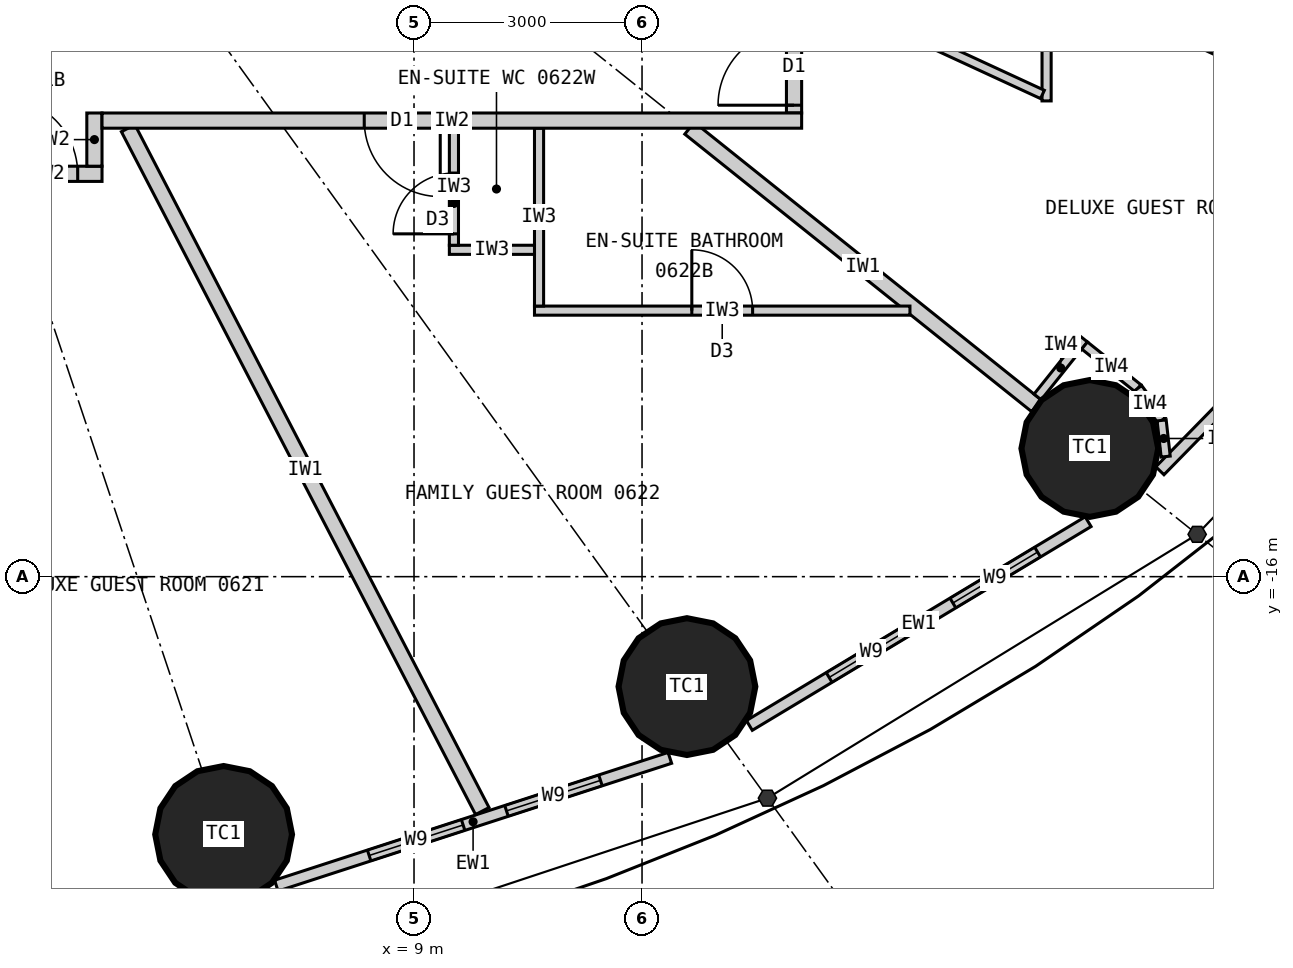
"""IFC4 building model, lengths in metres.
Left out: names, types, materials, properties, quantities, classifications, styles, units other than length and angle.
Written with IfcOpenShell. Run it as: python <this file> out.ifc"""

import sys

from ifc_helpers import new_model, si_unit, direction, frame, frame_2d, origin, origin_2d, place, context, subcontext, project, spatial, rectangle, circle, extrude, element, fill, save


model = new_model("IFC4")
c1 = context("Model", 3, precision=1e-05, world=origin(), true_north=direction((0.0, 1.0)))
c2 = subcontext(c1, "Body", "Model", "MODEL_VIEW")
j1 = project(units=[si_unit("LENGTHUNIT", "METRE"), si_unit("PLANEANGLEUNIT", "RADIAN")], contexts=[c1])
p1 = place(None, origin())
s1 = spatial("IfcSite", under=j1, at=p1, CompositionType="ELEMENT")
p2 = place(p1, origin())
s2 = spatial("IfcBuilding", under=s1, at=p2, CompositionType="ELEMENT")
p3 = place(p2, frame((0.0, 0.0, 32.7)))
s3 = spatial("IfcBuildingStorey", under=s2, at=p3, CompositionType="ELEMENT", Elevation=32.7)
for number, where, z_axis, x_axis in (
    (1, (6.495, -19.391, 0.0), (0.0, 0.0, 1.0), (1.0, 0.0, 0.0)),
    (2, (12.591, -17.447, 0.0), (0.0, 0.0, 1.0), (1.0, 0.0, 0.0)),
    (3, (17.892, -14.313, 0.0), (0.0, 0.0, 1.0), (1.0, 0.0, 0.0)),
):
    element("IfcColumn", number, at=place(p3, frame(where, z_axis=z_axis, x_axis=x_axis)), inside=s3, PredefinedType="COLUMN", context=c2, shape_type="SweptSolid", body=[
        extrude(circle(Radius=0.9, at=origin_2d()), origin(), (0.0, 0.0, 1.0), 3.3),
    ])
p4 = place(p3, frame((7.188, -20.065, 0.0), z_axis=(0.0, 0.0, 1.0), x_axis=(0.951138486029, 0.308764603532, 0.0)))
e4 = element("IfcWall", 4, at=p4, inside=s3, PredefinedType="ELEMENTEDWALL", context=c2, shape_type="SweptSolid", body=[
    extrude(rectangle(XDim=5.444, YDim=0.15, at=frame_2d((2.722, 0.0))), origin(), (0.0, 0.0, 1.0), 3.12),
])
p5 = place(p4, frame((1.284, 0.0, 0.9)))
e5 = element("IfcOpeningElement", 5, at=p5, cuts=e4, PredefinedType="OPENING", context=c2, shape_type="SweptSolid", body=[
    extrude(rectangle(XDim=1.3, YDim=1.9, at=frame_2d((0.65, 0.95))), frame((0.0, 0.085, 0.0), z_axis=(0.0, -1.0, 0.0), x_axis=(1.0, 0.0, 0.0)), (0.0, 0.0, 1.0), 0.17),
])
p6 = place(p4, frame((3.184, 0.0, 0.9)))
e6 = element("IfcOpeningElement", 6, at=p6, cuts=e4, PredefinedType="OPENING", context=c2, shape_type="SweptSolid", body=[
    extrude(rectangle(XDim=1.3, YDim=1.9, at=frame_2d((0.65, 0.95))), frame((0.0, 0.085, 0.0), z_axis=(0.0, -1.0, 0.0), x_axis=(1.0, 0.0, 0.0)), (0.0, 0.0, 1.0), 0.17),
])
p7 = place(p3, frame((13.412, -17.957, 0.0), z_axis=(0.0, 0.0, 1.0), x_axis=(0.856958191554, 0.515385931054, 0.0)))
e7 = element("IfcWall", 7, at=p7, inside=s3, PredefinedType="ELEMENTEDWALL", context=c2, shape_type="SweptSolid", body=[
    extrude(rectangle(XDim=5.201, YDim=0.15, at=frame_2d((2.601, 0.0))), origin(), (0.0, 0.0, 1.0), 3.12),
])
p8 = place(p7, frame((1.225, 0.0, 0.9)))
e8 = element("IfcOpeningElement", 8, at=p8, cuts=e7, PredefinedType="OPENING", context=c2, shape_type="SweptSolid", body=[
    extrude(rectangle(XDim=1.3, YDim=1.9, at=frame_2d((0.65, 0.95))), frame((0.0, 0.085, 0.0), z_axis=(0.0, -1.0, 0.0), x_axis=(1.0, 0.0, 0.0)), (0.0, 0.0, 1.0), 0.17),
])
p9 = place(p7, frame((3.125, 0.0, 0.9)))
e9 = element("IfcOpeningElement", 9, at=p9, cuts=e7, PredefinedType="OPENING", context=c2, shape_type="SweptSolid", body=[
    extrude(rectangle(XDim=1.3, YDim=1.9, at=frame_2d((0.65, 0.95))), frame((0.0, 0.085, 0.0), z_axis=(0.0, -1.0, 0.0), x_axis=(1.0, 0.0, 0.0)), (0.0, 0.0, 1.0), 0.17),
])
p10 = place(p3, frame((18.813, -14.607, 0.0), z_axis=(0.0, 0.0, 1.0), x_axis=(0.699612594083, 0.714522370679, 0.0)))
e10 = element("IfcWall", 10, at=p10, inside=s3, PredefinedType="ELEMENTEDWALL", context=c2, shape_type="SweptSolid", body=[
    extrude(rectangle(XDim=4.896, YDim=0.15, at=frame_2d((2.448, 0.0))), origin(), (0.0, 0.0, 1.0), 3.12),
])
p11 = place(p10, frame((1.077, 0.0, 0.9)))
e11 = element("IfcOpeningElement", 11, at=p11, cuts=e10, PredefinedType="OPENING", context=c2, shape_type="SweptSolid", body=[
    extrude(rectangle(XDim=1.3, YDim=1.9, at=frame_2d((0.65, 0.95))), frame((0.0, 0.085, 0.0), z_axis=(0.0, -1.0, 0.0), x_axis=(1.0, 0.0, 0.0)), (0.0, 0.0, 1.0), 0.17),
])
p12 = place(p10, frame((2.977, 0.0, 0.9)))
e12 = element("IfcOpeningElement", 12, at=p12, cuts=e10, PredefinedType="OPENING", context=c2, shape_type="SweptSolid", body=[
    extrude(rectangle(XDim=1.3, YDim=1.9, at=frame_2d((0.65, 0.95))), frame((0.0, 0.085, 0.0), z_axis=(0.0, -1.0, 0.0), x_axis=(1.0, 0.0, 0.0)), (0.0, 0.0, 1.0), 0.17),
])
p13 = place(p3, frame((5.239, -10.1, 0.0), z_axis=(0.0, 0.0, 1.0), x_axis=(0.460422783389, -0.887699758103, 0.0)))
e13 = element("IfcWall", 13, at=p13, inside=s3, PredefinedType="PARTITIONING", context=c2, shape_type="SweptSolid", body=[
    extrude(rectangle(XDim=10.12, YDim=0.2, at=frame_2d((5.06, 0.0))), origin(), (0.0, 0.0, 1.0), 3.12),
])
p14 = place(p3, frame((12.625, -10.1, 0.0), z_axis=(0.0, 0.0, 1.0), x_axis=(0.780872884676, -0.624689953479, 0.0)))
e14 = element("IfcWall", 14, at=p14, inside=s3, PredefinedType="PARTITIONING", context=c2, shape_type="SweptSolid", body=[
    extrude(rectangle(XDim=5.845, YDim=0.2, at=frame_2d((2.922, 0.0))), origin(), (0.0, 0.0, 1.0), 2.32),
])
p15 = place(p3, frame((14.1, -6.512, 0.0), z_axis=(0.0, 0.0, 1.0), x_axis=(0.907842433118, -0.41931147925, 0.0)))
e15 = element("IfcWall", 15, at=p15, inside=s3, PredefinedType="PARTITIONING", context=c2, shape_type="SweptSolid", body=[
    extrude(rectangle(XDim=7.823, YDim=0.2, at=frame_2d((3.912, 0.0))), origin(), (0.0, 0.0, 1.0), 2.32),
])
p16 = place(p3, frame((17.323, -8.101, 0.0), z_axis=(0.0, 0.0, 1.0), x_axis=(0.0, -1.0, 0.0)))
e16 = element("IfcWall", 16, at=p16, inside=s3, PredefinedType="PARTITIONING", context=c2, shape_type="SweptSolid", body=[
    extrude(rectangle(XDim=1.64, YDim=0.12, at=frame_2d((0.82, 0.0))), origin(), (0.0, 0.0, 1.0), 3.12),
])
p17 = place(p3, frame((14.1, -8.193, 0.0), z_axis=(0.0, 0.0, 1.0), x_axis=(0.907836493557, -0.419324338628, 0.0)))
e17 = element("IfcWall", 17, at=p17, inside=s3, PredefinedType="PARTITIONING", context=c2, shape_type="SweptSolid", body=[
    extrude(rectangle(XDim=3.49, YDim=0.12, at=frame_2d((1.745, 0.0))), origin(), (0.0, 0.0, 1.0), 3.12),
])
p18 = place(p17, frame((0.75, 0.0, 0.0)))
e18 = element("IfcOpeningElement", 18, at=p18, cuts=e17, PredefinedType="OPENING", context=c2, shape_type="SweptSolid", body=[
    extrude(rectangle(XDim=0.8, YDim=2.1, at=frame_2d((0.4, 1.05))), frame((0.0, 0.07, 0.0), z_axis=(0.0, -1.0, 0.0), x_axis=(1.0, 0.0, 0.0)), (0.0, 0.0, 1.0), 0.14),
])
p19 = place(p3, frame((15.525, -12.5, 0.0), z_axis=(0.0, 0.0, 1.0), x_axis=(-1.0, 0.0, 0.0)))
e19 = element("IfcWall", 19, at=p19, inside=s3, PredefinedType="PARTITIONING", context=c2, shape_type="SweptSolid", body=[
    extrude(rectangle(XDim=4.94, YDim=0.12, at=frame_2d((2.47, 0.0))), origin(), (0.0, 0.0, 1.0), 3.12),
])
p20 = place(p19, frame((2.07, 0.0, 0.0)))
e20 = element("IfcOpeningElement", 20, at=p20, cuts=e19, PredefinedType="OPENING", context=c2, shape_type="SweptSolid", body=[
    extrude(rectangle(XDim=0.8, YDim=2.1, at=frame_2d((0.4, 1.05))), frame((0.0, 0.07, 0.0), z_axis=(0.0, -1.0, 0.0), x_axis=(1.0, 0.0, 0.0)), (0.0, 0.0, 1.0), 0.14),
])
p21 = place(p3, frame((10.645, -10.1, 0.0), z_axis=(0.0, 0.0, 1.0), x_axis=(0.0, -1.0, 0.0)))
e21 = element("IfcWall", 21, at=p21, inside=s3, PredefinedType="PARTITIONING", context=c2, shape_type="SweptSolid", body=[
    extrude(rectangle(XDim=2.34, YDim=0.12, at=frame_2d((1.17, 0.0))), origin(), (0.0, 0.0, 1.0), 3.12),
])
p22 = place(p3, frame((10.585, -11.7, 0.0), z_axis=(0.0, 0.0, 1.0), x_axis=(-1.0, 0.0, 0.0)))
e22 = element("IfcWall", 22, at=p22, inside=s3, PredefinedType="PARTITIONING", context=c2, shape_type="SweptSolid", body=[
    extrude(rectangle(XDim=1.12, YDim=0.12, at=frame_2d((0.56, 0.0))), origin(), (0.0, 0.0, 1.0), 3.12),
])
p23 = place(p3, frame((9.525, -10.1, 0.0), z_axis=(0.0, 0.0, 1.0), x_axis=(0.0, -1.0, 0.0)))
e23 = element("IfcWall", 23, at=p23, inside=s3, PredefinedType="PARTITIONING", context=c2, shape_type="SweptSolid", body=[
    extrude(rectangle(XDim=1.54, YDim=0.12, at=frame_2d((0.77, 0.0))), origin(), (0.0, 0.0, 1.0), 3.12),
])
p24 = place(p23, frame((0.59, 0.0, 0.0)))
e24 = element("IfcOpeningElement", 24, at=p24, cuts=e23, PredefinedType="OPENING", context=c2, shape_type="SweptSolid", body=[
    extrude(rectangle(XDim=0.8, YDim=2.1, at=frame_2d((0.4, 1.05))), frame((0.0, 0.07, 0.0), z_axis=(0.0, -1.0, 0.0), x_axis=(1.0, 0.0, 0.0)), (0.0, 0.0, 1.0), 0.14),
])
p25 = place(p3, frame((4.895, -10.7, 0.0), z_axis=(0.0, 0.0, 1.0), x_axis=(-1.0, 0.0, 0.0)))
e25 = element("IfcWall", 25, at=p25, inside=s3, PredefinedType="PARTITIONING", context=c2, shape_type="SweptSolid", body=[
    extrude(rectangle(XDim=1.44, YDim=0.2, at=frame_2d((0.72, 0.0))), origin(), (0.0, 0.0, 1.0), 3.12),
])
p26 = place(p25, frame((0.32, 0.0, 0.0)))
e26 = element("IfcOpeningElement", 26, at=p26, cuts=e25, PredefinedType="OPENING", context=c2, shape_type="SweptSolid", body=[
    extrude(rectangle(XDim=1.0, YDim=2.2, at=frame_2d((0.5, 1.1))), frame((0.0, 0.11, 0.0), z_axis=(0.0, -1.0, 0.0), x_axis=(1.0, 0.0, 0.0)), (0.0, 0.0, 1.0), 0.22),
])
p27 = place(p3, frame((4.795, -9.9, 0.0), z_axis=(0.0, 0.0, 1.0), x_axis=(0.0, -1.0, 0.0)))
e27 = element("IfcWall", 27, at=p27, inside=s3, PredefinedType="PARTITIONING", context=c2, shape_type="SweptSolid", body=[
    extrude(rectangle(XDim=0.7, YDim=0.2, at=frame_2d((0.35, 0.0))), origin(), (0.0, 0.0, 1.0), 3.12),
])
p28 = place(p3, frame((14.0, -9.9, 0.0), z_axis=(0.0, 0.0, 1.0), x_axis=(0.0, 1.0, 0.0)))
e28 = element("IfcWall", 28, at=p28, inside=s3, PredefinedType="PARTITIONING", context=c2, shape_type="SweptSolid", body=[
    extrude(rectangle(XDim=5.827, YDim=0.2, at=frame_2d((2.914, 0.0))), origin(), (0.0, 0.0, 1.0), 3.12),
])
p29 = place(p28, frame((0.103, 0.0, 0.0)))
e29 = element("IfcOpeningElement", 29, at=p29, cuts=e28, PredefinedType="OPENING", context=c2, shape_type="SweptSolid", body=[
    extrude(rectangle(XDim=1.0, YDim=2.2, at=frame_2d((0.5, 1.1))), frame((0.0, 0.11, 0.0), z_axis=(0.0, -1.0, 0.0), x_axis=(1.0, 0.0, 0.0)), (0.0, 0.0, 1.0), 0.22),
])
p30 = place(p3, frame((14.1, -10.0, 0.0), z_axis=(0.0, 0.0, 1.0), x_axis=(-1.0, 0.0, 0.0)))
e30 = element("IfcWall", 30, at=p30, inside=s3, PredefinedType="PARTITIONING", context=c2, shape_type="SweptSolid", body=[
    extrude(rectangle(XDim=9.205, YDim=0.2, at=frame_2d((4.603, 0.0))), origin(), (0.0, 0.0, 1.0), 3.12),
])
p31 = place(p30, frame((4.755, 0.0, 0.0)))
e31 = element("IfcOpeningElement", 31, at=p31, cuts=e30, PredefinedType="OPENING", context=c2, shape_type="SweptSolid", body=[
    extrude(rectangle(XDim=1.0, YDim=2.2, at=frame_2d((0.5, 1.1))), frame((0.0, 0.11, 0.0), z_axis=(0.0, -1.0, 0.0), x_axis=(1.0, 0.0, 0.0)), (0.0, 0.0, 1.0), 0.22),
])
p32 = place(p3, frame((17.205, -13.635, 0.0), z_axis=(0.0, 0.0, 1.0), x_axis=(0.624756144097, 0.780819928289, 0.0)))
e32 = element("IfcWall", 32, at=p32, inside=s3, PredefinedType="PARTITIONING", context=c2, shape_type="SweptSolid", body=[
    extrude(rectangle(XDim=0.975, YDim=0.12, at=frame_2d((0.487, 0.0))), origin(), (0.0, 0.0, 1.0), 3.12),
])
p33 = place(p3, frame((17.823, -12.959, 0.0), z_axis=(0.0, 0.0, 1.0), x_axis=(0.780895271023, -0.624661969144, 0.0)))
e33 = element("IfcWall", 33, at=p33, inside=s3, PredefinedType="PARTITIONING", context=c2, shape_type="SweptSolid", body=[
    extrude(rectangle(XDim=0.9, YDim=0.12, at=frame_2d((0.45, 0.0))), origin(), (0.0, 0.0, 1.0), 3.12),
])
p34 = place(p3, frame((18.526, -13.521, 0.0), z_axis=(0.0, 0.0, 1.0), x_axis=(0.592532503205, -0.805546542818, 0.0)))
e34 = element("IfcWall", 34, at=p34, inside=s3, PredefinedType="PARTITIONING", context=c2, shape_type="SweptSolid", body=[
    extrude(rectangle(XDim=0.525, YDim=0.12, at=frame_2d((0.262, 0.0))), origin(), (0.0, 0.0, 1.0), 3.12),
])
p35 = place(p3, frame((18.837, -13.944, 0.0), z_axis=(0.0, 0.0, 1.0), x_axis=(0.110543348478, -0.993871303594, 0.0)))
e35 = element("IfcWall", 35, at=p35, inside=s3, PredefinedType="PARTITIONING", context=c2, shape_type="SweptSolid", body=[
    extrude(rectangle(XDim=0.479, YDim=0.12, at=frame_2d((0.24, 0.0))), origin(), (0.0, 0.0, 1.0), 3.12),
])
p36 = place(p5, origin())
e36 = element("IfcWindow", 36, at=p36, inside=s3, PartitioningType="SINGLE_PANEL", PredefinedType="WINDOW", context=c2, shape_type="SweptSolid", body=[
    extrude(rectangle(XDim=1.3, YDim=1.9, at=frame_2d((0.65, 0.95))), frame((0.0, 0.03, 0.0), z_axis=(0.0, -1.0, 0.0), x_axis=(1.0, 0.0, 0.0)), (0.0, 0.0, 1.0), 0.06),
])
fill(e5, e36)
p37 = place(p6, origin())
e37 = element("IfcWindow", 37, at=p37, inside=s3, PartitioningType="SINGLE_PANEL", PredefinedType="WINDOW", context=c2, shape_type="SweptSolid", body=[
    extrude(rectangle(XDim=1.3, YDim=1.9, at=frame_2d((0.65, 0.95))), frame((0.0, 0.03, 0.0), z_axis=(0.0, -1.0, 0.0), x_axis=(1.0, 0.0, 0.0)), (0.0, 0.0, 1.0), 0.06),
])
fill(e6, e37)
p38 = place(p8, origin())
e38 = element("IfcWindow", 38, at=p38, inside=s3, PartitioningType="SINGLE_PANEL", PredefinedType="WINDOW", context=c2, shape_type="SweptSolid", body=[
    extrude(rectangle(XDim=1.3, YDim=1.9, at=frame_2d((0.65, 0.95))), frame((0.0, 0.03, 0.0), z_axis=(0.0, -1.0, 0.0), x_axis=(1.0, 0.0, 0.0)), (0.0, 0.0, 1.0), 0.06),
])
fill(e8, e38)
p39 = place(p9, origin())
e39 = element("IfcWindow", 39, at=p39, inside=s3, PartitioningType="SINGLE_PANEL", PredefinedType="WINDOW", context=c2, shape_type="SweptSolid", body=[
    extrude(rectangle(XDim=1.3, YDim=1.9, at=frame_2d((0.65, 0.95))), frame((0.0, 0.03, 0.0), z_axis=(0.0, -1.0, 0.0), x_axis=(1.0, 0.0, 0.0)), (0.0, 0.0, 1.0), 0.06),
])
fill(e9, e39)
p40 = place(p29, origin())
e40 = element("IfcDoor", 40, at=p40, inside=s3, OperationType="SINGLE_SWING_LEFT", PredefinedType="DOOR", context=c2, shape_type="SweptSolid", body=[
    extrude(rectangle(XDim=1.0, YDim=2.2, at=frame_2d((0.5, 1.1))), frame((0.0, 0.025, 0.0), z_axis=(0.0, -1.0, 0.0), x_axis=(1.0, 0.0, 0.0)), (0.0, 0.0, 1.0), 0.05),
])
fill(e29, e40)
p41 = place(p26, origin())
e41 = element("IfcDoor", 41, at=p41, inside=s3, OperationType="SINGLE_SWING_RIGHT", PredefinedType="DOOR", context=c2, shape_type="SweptSolid", body=[
    extrude(rectangle(XDim=1.0, YDim=2.2, at=frame_2d((0.5, 1.1))), frame((0.0, 0.025, 0.0), z_axis=(0.0, -1.0, 0.0), x_axis=(1.0, 0.0, 0.0)), (0.0, 0.0, 1.0), 0.05),
])
fill(e26, e41)
p42 = place(p20, origin())
e42 = element("IfcDoor", 42, at=p42, inside=s3, OperationType="SINGLE_SWING_RIGHT", PredefinedType="DOOR", context=c2, shape_type="SweptSolid", body=[
    extrude(rectangle(XDim=0.8, YDim=2.1, at=frame_2d((0.4, 1.05))), frame((0.0, 0.025, 0.0), z_axis=(0.0, -1.0, 0.0), x_axis=(1.0, 0.0, 0.0)), (0.0, 0.0, 1.0), 0.05),
])
fill(e20, e42)
p43 = place(p24, origin())
e43 = element("IfcDoor", 43, at=p43, inside=s3, OperationType="SINGLE_SWING_RIGHT", PredefinedType="DOOR", context=c2, shape_type="SweptSolid", body=[
    extrude(rectangle(XDim=0.8, YDim=2.1, at=frame_2d((0.4, 1.05))), frame((0.0, 0.025, 0.0), z_axis=(0.0, -1.0, 0.0), x_axis=(1.0, 0.0, 0.0)), (0.0, 0.0, 1.0), 0.05),
])
fill(e24, e43)
p44 = place(p31, origin())
e44 = element("IfcDoor", 44, at=p44, inside=s3, OperationType="SINGLE_SWING_LEFT", PredefinedType="DOOR", context=c2, shape_type="SweptSolid", body=[
    extrude(rectangle(XDim=1.0, YDim=2.2, at=frame_2d((0.5, 1.1))), frame((0.0, 0.025, 0.0), z_axis=(0.0, -1.0, 0.0), x_axis=(1.0, 0.0, 0.0)), (0.0, 0.0, 1.0), 0.05),
])
fill(e31, e44)
save(model, sys.argv[1])
